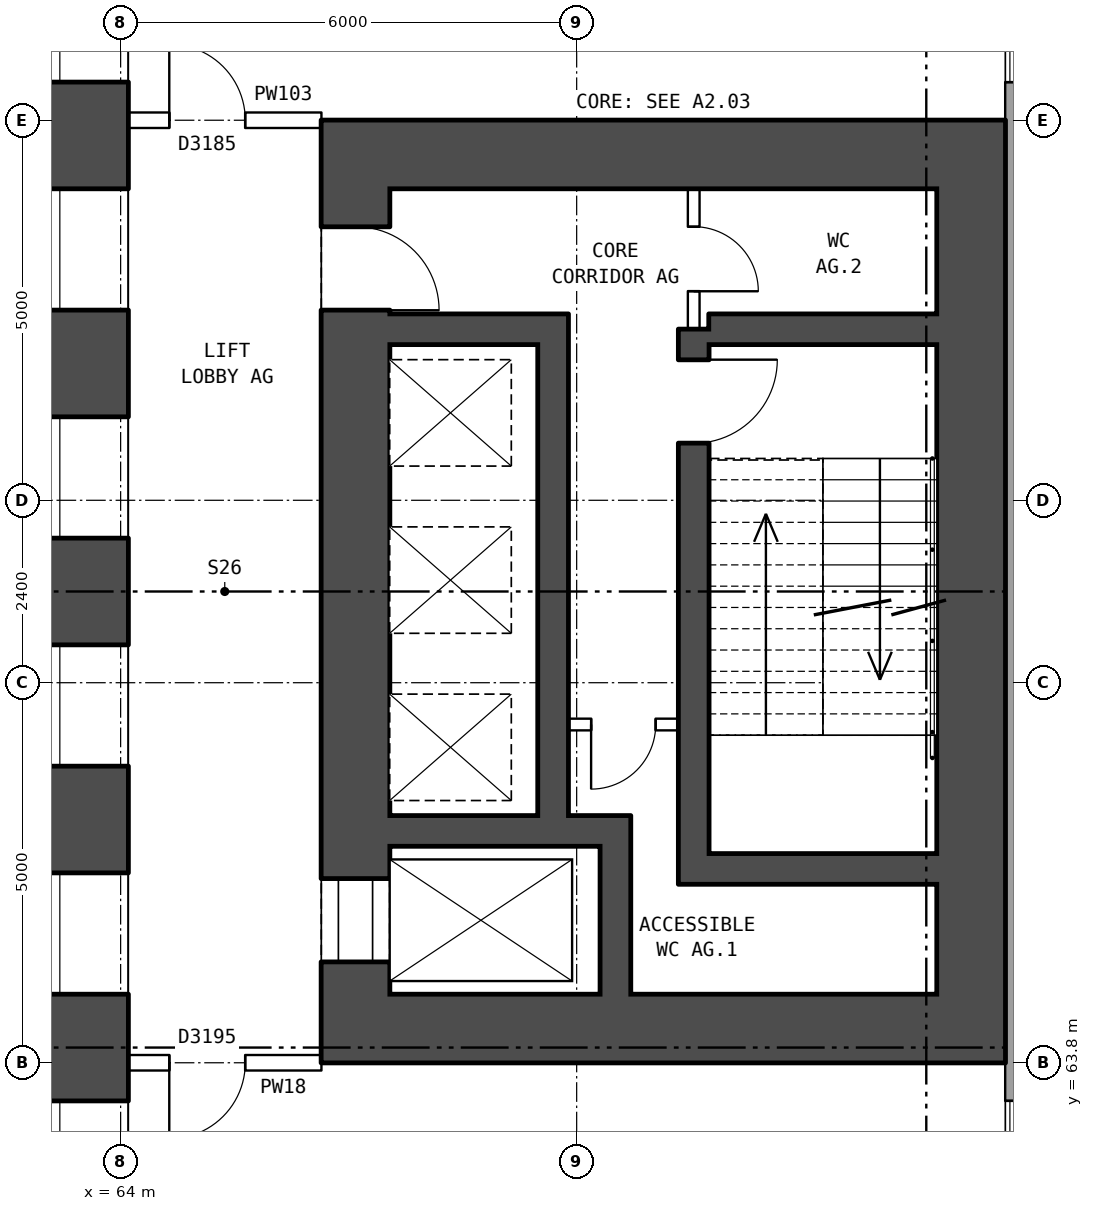
"""IFC4 building model, lengths in metres.
Left out: names, types, materials, properties, quantities, classifications, styles, units other than length and angle.
Written with IfcOpenShell. Run it as: python <this file> out.ifc"""

import sys

from ifc_helpers import new_model, si_unit, direction, frame, frame_2d, origin, place, context, subcontext, project, spatial, rectangle, extrude, element, fill, save


model = new_model("IFC4")
c1 = context("Model", 3, precision=1e-05, world=origin(), true_north=direction((0.0, 1.0)))
c2 = subcontext(c1, "Body", "Model", "MODEL_VIEW")
j1 = project(units=[si_unit("LENGTHUNIT", "METRE"), si_unit("PLANEANGLEUNIT", "RADIAN")], contexts=[c1])
p1 = place(None, origin())
s1 = spatial("IfcSite", under=j1, at=p1, CompositionType="ELEMENT")
p2 = place(p1, origin())
s2 = spatial("IfcBuilding", under=s1, at=p2, CompositionType="ELEMENT")
p3 = place(p2, frame((0.0, 0.0, 10.1)))
s3 = spatial("IfcBuildingStorey", under=s2, at=p3, CompositionType="ELEMENT", Elevation=10.1)
p4 = place(p3, frame((63.5, 56.4, -0.3), z_axis=(0.0, 0.0, 1.0), x_axis=(0.0, 1.0, 0.0)))
e1 = element("IfcWall", 1, at=p4, inside=s3, PredefinedType="SHEAR", context=c2, shape_type="SweptSolid", body=[
    extrude(rectangle(XDim=27.2, YDim=1.2, at=frame_2d((13.6, 0.0))), origin(), (0.0, 0.0, 1.0), 4.4),
])
p5 = place(p4, frame((2.3, 0.0, 0.8)))
e2 = element("IfcOpeningElement", 2, at=p5, cuts=e1, PredefinedType="OPENING", context=c2, shape_type="SweptSolid", body=[
    extrude(rectangle(XDim=1.6, YDim=1.8, at=frame_2d((0.8, 0.9))), frame((0.0, 0.61, 0.0), z_axis=(0.0, -1.0, 0.0), x_axis=(1.0, 0.0, 0.0)), (0.0, 0.0, 1.0), 1.22),
])
p6 = place(p4, frame((5.3, 0.0, 0.8)))
e3 = element("IfcOpeningElement", 3, at=p6, cuts=e1, PredefinedType="OPENING", context=c2, shape_type="SweptSolid", body=[
    extrude(rectangle(XDim=1.6, YDim=1.8, at=frame_2d((0.8, 0.9))), frame((0.0, 0.61, 0.0), z_axis=(0.0, -1.0, 0.0), x_axis=(1.0, 0.0, 0.0)), (0.0, 0.0, 1.0), 1.22),
])
p7 = place(p4, frame((8.3, 0.0, 0.8)))
e4 = element("IfcOpeningElement", 4, at=p7, cuts=e1, PredefinedType="OPENING", context=c2, shape_type="SweptSolid", body=[
    extrude(rectangle(XDim=1.6, YDim=1.8, at=frame_2d((0.8, 0.9))), frame((0.0, 0.61, 0.0), z_axis=(0.0, -1.0, 0.0), x_axis=(1.0, 0.0, 0.0)), (0.0, 0.0, 1.0), 1.22),
])
p8 = place(p4, frame((11.3, 0.0, 0.8)))
e5 = element("IfcOpeningElement", 5, at=p8, cuts=e1, PredefinedType="OPENING", context=c2, shape_type="SweptSolid", body=[
    extrude(rectangle(XDim=1.6, YDim=1.8, at=frame_2d((0.8, 0.9))), frame((0.0, 0.61, 0.0), z_axis=(0.0, -1.0, 0.0), x_axis=(1.0, 0.0, 0.0)), (0.0, 0.0, 1.0), 1.22),
])
p9 = place(p4, frame((14.3, 0.0, 0.8)))
e6 = element("IfcOpeningElement", 6, at=p9, cuts=e1, PredefinedType="OPENING", context=c2, shape_type="SweptSolid", body=[
    extrude(rectangle(XDim=1.6, YDim=1.8, at=frame_2d((0.8, 0.9))), frame((0.0, 0.61, 0.0), z_axis=(0.0, -1.0, 0.0), x_axis=(1.0, 0.0, 0.0)), (0.0, 0.0, 1.0), 1.22),
])
p10 = place(p4, frame((17.3, 0.0, 0.8)))
e7 = element("IfcOpeningElement", 7, at=p10, cuts=e1, PredefinedType="OPENING", context=c2, shape_type="SweptSolid", body=[
    extrude(rectangle(XDim=1.6, YDim=1.8, at=frame_2d((0.8, 0.9))), frame((0.0, 0.61, 0.0), z_axis=(0.0, -1.0, 0.0), x_axis=(1.0, 0.0, 0.0)), (0.0, 0.0, 1.0), 1.22),
])
p11 = place(p4, frame((20.3, 0.0, 0.8)))
e8 = element("IfcOpeningElement", 8, at=p11, cuts=e1, PredefinedType="OPENING", context=c2, shape_type="SweptSolid", body=[
    extrude(rectangle(XDim=1.6, YDim=1.8, at=frame_2d((0.8, 0.9))), frame((0.0, 0.61, 0.0), z_axis=(0.0, -1.0, 0.0), x_axis=(1.0, 0.0, 0.0)), (0.0, 0.0, 1.0), 1.22),
])
p12 = place(p4, frame((23.3, 0.0, 0.8)))
e9 = element("IfcOpeningElement", 9, at=p12, cuts=e1, PredefinedType="OPENING", context=c2, shape_type="SweptSolid", body=[
    extrude(rectangle(XDim=1.6, YDim=1.8, at=frame_2d((0.8, 0.9))), frame((0.0, 0.61, 0.0), z_axis=(0.0, -1.0, 0.0), x_axis=(1.0, 0.0, 0.0)), (0.0, 0.0, 1.0), 1.22),
])
p13 = place(p3, frame((75.82, 57.075, 0.0), z_axis=(0.0, 0.0, 1.0), x_axis=(0.0, 1.0, 0.0)))
e10 = element("IfcWall", 10, at=p13, inside=s3, PredefinedType="STANDARD", context=c2, shape_type="SweptSolid", body=[
    extrude(rectangle(XDim=25.851, YDim=0.36, at=frame_2d((12.925, 0.0))), origin(), (0.0, 0.0, 1.0), 4.3),
])
p14 = place(p13, frame((1.625, 0.0, 0.8)))
e11 = element("IfcOpeningElement", 11, at=p14, cuts=e10, PredefinedType="OPENING", context=c2, shape_type="SweptSolid", body=[
    extrude(rectangle(XDim=1.6, YDim=1.8, at=frame_2d((0.8, 0.9))), frame((0.0, 0.19, 0.0), z_axis=(0.0, -1.0, 0.0), x_axis=(1.0, 0.0, 0.0)), (0.0, 0.0, 1.0), 0.38),
])
p15 = place(p13, frame((4.625, 0.0, 0.8)))
e12 = element("IfcOpeningElement", 12, at=p15, cuts=e10, PredefinedType="OPENING", context=c2, shape_type="SweptSolid", body=[
    extrude(rectangle(XDim=1.6, YDim=1.8, at=frame_2d((0.8, 0.9))), frame((0.0, 0.19, 0.0), z_axis=(0.0, -1.0, 0.0), x_axis=(1.0, 0.0, 0.0)), (0.0, 0.0, 1.0), 0.38),
])
p16 = place(p13, frame((19.625, 0.0, 0.8)))
e13 = element("IfcOpeningElement", 13, at=p16, cuts=e10, PredefinedType="OPENING", context=c2, shape_type="SweptSolid", body=[
    extrude(rectangle(XDim=1.6, YDim=1.8, at=frame_2d((0.8, 0.9))), frame((0.0, 0.19, 0.0), z_axis=(0.0, -1.0, 0.0), x_axis=(1.0, 0.0, 0.0)), (0.0, 0.0, 1.0), 0.38),
])
p17 = place(p13, frame((22.625, 0.0, 0.8)))
e14 = element("IfcOpeningElement", 14, at=p17, cuts=e10, PredefinedType="OPENING", context=c2, shape_type="SweptSolid", body=[
    extrude(rectangle(XDim=1.6, YDim=1.8, at=frame_2d((0.8, 0.9))), frame((0.0, 0.19, 0.0), z_axis=(0.0, -1.0, 0.0), x_axis=(1.0, 0.0, 0.0)), (0.0, 0.0, 1.0), 0.38),
])
p18 = place(p3, frame((67.09, 64.7, 0.0), z_axis=(0.0, 0.0, 1.0), x_axis=(0.0, 1.0, 0.0)))
e15 = element("IfcWall", 15, at=p18, inside=s3, PredefinedType="SHEAR", context=c2, shape_type="SweptSolid", body=[
    extrude(rectangle(XDim=10.6, YDim=0.9, at=frame_2d((5.3, 0.0))), origin(), (0.0, 0.0, 1.0), 4.3),
])
p19 = place(p18, frame((0.425, 0.0, 0.0)))
e16 = element("IfcOpeningElement", 16, at=p19, cuts=e15, PredefinedType="OPENING", context=c2, shape_type="SweptSolid", body=[
    extrude(rectangle(XDim=1.1, YDim=2.1, at=frame_2d((0.55, 1.05))), frame((0.0, 0.46, 0.0), z_axis=(0.0, -1.0, 0.0), x_axis=(1.0, 0.0, 0.0)), (0.0, 0.0, 1.0), 0.92),
])
p20 = place(p18, frame((9.0, 0.0, 0.0)))
e17 = element("IfcOpeningElement", 17, at=p20, cuts=e15, PredefinedType="OPENING", context=c2, shape_type="SweptSolid", body=[
    extrude(rectangle(XDim=1.1, YDim=2.1, at=frame_2d((0.55, 1.05))), frame((0.0, 0.46, 0.0), z_axis=(0.0, -1.0, 0.0), x_axis=(1.0, 0.0, 0.0)), (0.0, 0.0, 1.0), 0.92),
])
p21 = place(p3, frame((75.19, 64.7, 0.0), z_axis=(0.0, 0.0, 1.0), x_axis=(0.0, 1.0, 0.0)))
e18 = element("IfcWall", 18, at=p21, inside=s3, PredefinedType="SHEAR", context=c2, shape_type="SweptSolid", body=[
    extrude(rectangle(XDim=10.6, YDim=0.9, at=frame_2d((5.3, 0.0))), origin(), (0.0, 0.0, 1.0), 4.3),
])
for number, where, z_axis, x_axis in (
    (19, (66.64, 64.25, 0.0), (0.0, 0.0, 1.0), (1.0, 0.0, 0.0)),
    (20, (66.64, 75.75, 0.0), (0.0, 0.0, 1.0), (1.0, 0.0, 0.0)),
):
    element("IfcWall", number, at=place(p3, frame(where, z_axis=z_axis, x_axis=x_axis)), inside=s3, PredefinedType="SHEAR", context=c2, shape_type="SweptSolid", body=[
        extrude(rectangle(XDim=9.0, YDim=0.9, at=frame_2d((4.5, 0.0))), origin(), (0.0, 0.0, 1.0), 4.3),
    ])
p22 = place(p3, frame((71.74, 66.35, 0.0), z_axis=(0.0, 0.0, 1.0), x_axis=(1.0, 0.0, 0.0)))
e21 = element("IfcWall", 21, at=p22, inside=s3, PredefinedType="SHEAR", context=c2, shape_type="SweptSolid", body=[
    extrude(rectangle(XDim=3.0, YDim=0.4, at=frame_2d((1.5, 0.0))), origin(), (0.0, 0.0, 1.0), 4.3),
])
p23 = place(p3, frame((67.54, 66.85, 0.0), z_axis=(0.0, 0.0, 1.0), x_axis=(1.0, 0.0, 0.0)))
e22 = element("IfcWall", 22, at=p23, inside=s3, PredefinedType="SHEAR", context=c2, shape_type="SweptSolid", body=[
    extrude(rectangle(XDim=3.17, YDim=0.4, at=frame_2d((1.585, 0.0))), origin(), (0.0, 0.0, 1.0), 4.3),
])
p24 = place(p3, frame((69.89, 68.25, 0.0), z_axis=(0.0, 0.0, 1.0), x_axis=(1.0, 0.0, 0.0)))
e23 = element("IfcWall", 23, at=p24, inside=s3, PredefinedType="PARTITIONING", context=c2, shape_type="SweptSolid", body=[
    extrude(rectangle(XDim=1.45, YDim=0.15, at=frame_2d((0.725, 0.0))), origin(), (0.0, 0.0, 1.0), 4.3),
])
p25 = place(p24, frame((0.3, 0.0, 0.0)))
e24 = element("IfcOpeningElement", 24, at=p25, cuts=e23, PredefinedType="OPENING", context=c2, shape_type="SweptSolid", body=[
    extrude(rectangle(XDim=0.85, YDim=2.1, at=frame_2d((0.425, 1.05))), frame((0.0, 0.085, 0.0), z_axis=(0.0, -1.0, 0.0), x_axis=(1.0, 0.0, 0.0)), (0.0, 0.0, 1.0), 0.17),
])
p26 = place(p3, frame((67.54, 73.45, 0.0), z_axis=(0.0, 0.0, 1.0), x_axis=(1.0, 0.0, 0.0)))
e25 = element("IfcWall", 25, at=p26, inside=s3, PredefinedType="SHEAR", context=c2, shape_type="SweptSolid", body=[
    extrude(rectangle(XDim=1.95, YDim=0.4, at=frame_2d((0.975, 0.0))), origin(), (0.0, 0.0, 1.0), 4.3),
])
p27 = place(p3, frame((71.74, 73.45, 0.0), z_axis=(0.0, 0.0, 1.0), x_axis=(1.0, 0.0, 0.0)))
e26 = element("IfcWall", 26, at=p27, inside=s3, PredefinedType="SHEAR", context=c2, shape_type="SweptSolid", body=[
    extrude(rectangle(XDim=3.0, YDim=0.4, at=frame_2d((1.5, 0.0))), origin(), (0.0, 0.0, 1.0), 4.3),
])
p28 = place(p3, frame((69.69, 67.05, 0.0), z_axis=(0.0, 0.0, 1.0), x_axis=(0.0, 1.0, 0.0)))
e27 = element("IfcWall", 27, at=p28, inside=s3, PredefinedType="SHEAR", context=c2, shape_type="SweptSolid", body=[
    extrude(rectangle(XDim=6.6, YDim=0.4, at=frame_2d((3.3, 0.0))), origin(), (0.0, 0.0, 1.0), 4.3),
])
p29 = place(p3, frame((70.51, 64.7, 0.0), z_axis=(0.0, 0.0, 1.0), x_axis=(0.0, 1.0, 0.0)))
e28 = element("IfcWall", 28, at=p29, inside=s3, PredefinedType="SHEAR", context=c2, shape_type="SweptSolid", body=[
    extrude(rectangle(XDim=1.95, YDim=0.4, at=frame_2d((0.975, 0.0))), origin(), (0.0, 0.0, 1.0), 4.3),
])
p30 = place(p3, frame((71.54, 66.15, 0.0), z_axis=(0.0, 0.0, 1.0), x_axis=(0.0, 1.0, 0.0)))
e29 = element("IfcWall", 29, at=p30, inside=s3, PredefinedType="SHEAR", context=c2, shape_type="SweptSolid", body=[
    extrude(rectangle(XDim=7.3, YDim=0.4, at=frame_2d((3.65, 0.0))), origin(), (0.0, 0.0, 1.0), 4.3),
])
p31 = place(p30, frame((5.8, 0.0, 0.0)))
e30 = element("IfcOpeningElement", 30, at=p31, cuts=e29, PredefinedType="OPENING", context=c2, shape_type="SweptSolid", body=[
    extrude(rectangle(XDim=1.1, YDim=2.1, at=frame_2d((0.55, 1.05))), frame((0.0, 0.21, 0.0), z_axis=(0.0, -1.0, 0.0), x_axis=(1.0, 0.0, 0.0)), (0.0, 0.0, 1.0), 0.42),
])
p32 = place(p3, frame((71.54, 73.45, 0.0), z_axis=(0.0, 0.0, 1.0), x_axis=(0.0, 1.0, 0.0)))
e31 = element("IfcWall", 31, at=p32, inside=s3, PredefinedType="PARTITIONING", context=c2, shape_type="SweptSolid", body=[
    extrude(rectangle(XDim=1.85, YDim=0.15, at=frame_2d((0.925, 0.0))), origin(), (0.0, 0.0, 1.0), 4.3),
])
p33 = place(p32, frame((0.5, 0.0, 0.0)))
e32 = element("IfcOpeningElement", 32, at=p33, cuts=e31, PredefinedType="OPENING", context=c2, shape_type="SweptSolid", body=[
    extrude(rectangle(XDim=0.85, YDim=2.1, at=frame_2d((0.425, 1.05))), frame((0.0, 0.085, 0.0), z_axis=(0.0, -1.0, 0.0), x_axis=(1.0, 0.0, 0.0)), (0.0, 0.0, 1.0), 0.17),
])
p34 = place(p3, frame((64.1, 63.8, 0.0), z_axis=(0.0, 0.0, 1.0), x_axis=(1.0, 0.0, 0.0)))
e33 = element("IfcWall", 33, at=p34, inside=s3, PredefinedType="PARTITIONING", context=c2, shape_type="SweptSolid", body=[
    extrude(rectangle(XDim=2.54, YDim=0.2, at=frame_2d((1.27, 0.0))), origin(), (0.0, 0.0, 1.0), 4.3),
])
p35 = place(p34, frame((0.54, 0.0, 0.0)))
e34 = element("IfcOpeningElement", 34, at=p35, cuts=e33, PredefinedType="OPENING", context=c2, shape_type="SweptSolid", body=[
    extrude(rectangle(XDim=1.0, YDim=2.1, at=frame_2d((0.5, 1.05))), frame((0.0, 0.11, 0.0), z_axis=(0.0, -1.0, 0.0), x_axis=(1.0, 0.0, 0.0)), (0.0, 0.0, 1.0), 0.22),
])
p36 = place(p3, frame((64.1, 76.2, 0.0), z_axis=(0.0, 0.0, 1.0), x_axis=(1.0, 0.0, 0.0)))
e35 = element("IfcWall", 35, at=p36, inside=s3, PredefinedType="PARTITIONING", context=c2, shape_type="SweptSolid", body=[
    extrude(rectangle(XDim=2.54, YDim=0.2, at=frame_2d((1.27, 0.0))), origin(), (0.0, 0.0, 1.0), 4.3),
])
p37 = place(p36, frame((0.54, 0.0, 0.0)))
e36 = element("IfcOpeningElement", 36, at=p37, cuts=e35, PredefinedType="OPENING", context=c2, shape_type="SweptSolid", body=[
    extrude(rectangle(XDim=1.0, YDim=2.1, at=frame_2d((0.5, 1.05))), frame((0.0, 0.11, 0.0), z_axis=(0.0, -1.0, 0.0), x_axis=(1.0, 0.0, 0.0)), (0.0, 0.0, 1.0), 0.22),
])
p38 = place(p15, origin())
e37 = element("IfcWindow", 37, at=p38, inside=s3, PartitioningType="SINGLE_PANEL", PredefinedType="WINDOW", context=c2, shape_type="SweptSolid", body=[
    extrude(rectangle(XDim=1.6, YDim=1.8, at=frame_2d((0.8, 0.9))), frame((0.0, 0.15, 0.0), z_axis=(0.0, -1.0, 0.0), x_axis=(1.0, 0.0, 0.0)), (0.0, 0.0, 1.0), 0.06),
])
fill(e12, e37)
p39 = place(p16, origin())
e38 = element("IfcWindow", 38, at=p39, inside=s3, PartitioningType="SINGLE_PANEL", PredefinedType="WINDOW", context=c2, shape_type="SweptSolid", body=[
    extrude(rectangle(XDim=1.6, YDim=1.8, at=frame_2d((0.8, 0.9))), frame((0.0, 0.15, 0.0), z_axis=(0.0, -1.0, 0.0), x_axis=(1.0, 0.0, 0.0)), (0.0, 0.0, 1.0), 0.06),
])
fill(e13, e38)
p40 = place(p6, origin())
e39 = element("IfcWindow", 39, at=p40, inside=s3, PartitioningType="SINGLE_PANEL", PredefinedType="WINDOW", context=c2, shape_type="SweptSolid", body=[
    extrude(rectangle(XDim=1.6, YDim=1.8, at=frame_2d((0.8, 0.9))), frame((0.0, 0.33, 0.0), z_axis=(0.0, -1.0, 0.0), x_axis=(1.0, 0.0, 0.0)), (0.0, 0.0, 1.0), 0.06),
])
fill(e3, e39)
p41 = place(p7, origin())
e40 = element("IfcWindow", 40, at=p41, inside=s3, PartitioningType="SINGLE_PANEL", PredefinedType="WINDOW", context=c2, shape_type="SweptSolid", body=[
    extrude(rectangle(XDim=1.6, YDim=1.8, at=frame_2d((0.8, 0.9))), frame((0.0, 0.33, 0.0), z_axis=(0.0, -1.0, 0.0), x_axis=(1.0, 0.0, 0.0)), (0.0, 0.0, 1.0), 0.06),
])
fill(e4, e40)
p42 = place(p8, origin())
e41 = element("IfcWindow", 41, at=p42, inside=s3, PartitioningType="SINGLE_PANEL", PredefinedType="WINDOW", context=c2, shape_type="SweptSolid", body=[
    extrude(rectangle(XDim=1.6, YDim=1.8, at=frame_2d((0.8, 0.9))), frame((0.0, 0.33, 0.0), z_axis=(0.0, -1.0, 0.0), x_axis=(1.0, 0.0, 0.0)), (0.0, 0.0, 1.0), 0.06),
])
fill(e5, e41)
p43 = place(p9, origin())
e42 = element("IfcWindow", 42, at=p43, inside=s3, PartitioningType="SINGLE_PANEL", PredefinedType="WINDOW", context=c2, shape_type="SweptSolid", body=[
    extrude(rectangle(XDim=1.6, YDim=1.8, at=frame_2d((0.8, 0.9))), frame((0.0, 0.33, 0.0), z_axis=(0.0, -1.0, 0.0), x_axis=(1.0, 0.0, 0.0)), (0.0, 0.0, 1.0), 0.06),
])
fill(e6, e42)
p44 = place(p10, origin())
e43 = element("IfcWindow", 43, at=p44, inside=s3, PartitioningType="SINGLE_PANEL", PredefinedType="WINDOW", context=c2, shape_type="SweptSolid", body=[
    extrude(rectangle(XDim=1.6, YDim=1.8, at=frame_2d((0.8, 0.9))), frame((0.0, 0.33, 0.0), z_axis=(0.0, -1.0, 0.0), x_axis=(1.0, 0.0, 0.0)), (0.0, 0.0, 1.0), 0.06),
])
fill(e7, e43)
p45 = place(p11, origin())
e44 = element("IfcWindow", 44, at=p45, inside=s3, PartitioningType="SINGLE_PANEL", PredefinedType="WINDOW", context=c2, shape_type="SweptSolid", body=[
    extrude(rectangle(XDim=1.6, YDim=1.8, at=frame_2d((0.8, 0.9))), frame((0.0, 0.33, 0.0), z_axis=(0.0, -1.0, 0.0), x_axis=(1.0, 0.0, 0.0)), (0.0, 0.0, 1.0), 0.06),
])
fill(e8, e44)
p46 = place(p19, origin())
e45 = element("IfcDoor", 45, at=p46, inside=s3, OperationType="DOUBLE_DOOR_SLIDING", PredefinedType="DOOR", context=c2, shape_type="SweptSolid", body=[
    extrude(rectangle(XDim=1.1, YDim=2.1, at=frame_2d((0.55, 1.05))), frame((0.0, -0.385, 0.0), z_axis=(0.0, -1.0, 0.0), x_axis=(1.0, 0.0, 0.0)), (0.0, 0.0, 1.0), 0.05),
])
fill(e16, e45)
p47 = place(p20, frame((1.1, 0.0, 0.0), z_axis=(0.0, 0.0, 1.0), x_axis=(-1.0, 0.0, 0.0)))
e46 = element("IfcDoor", 46, at=p47, inside=s3, OperationType="SINGLE_SWING_RIGHT", PredefinedType="DOOR", context=c2, shape_type="SweptSolid", body=[
    extrude(rectangle(XDim=1.1, YDim=2.1, at=frame_2d((0.55, 1.05))), frame((0.0, 0.435, 0.0), z_axis=(0.0, -1.0, 0.0), x_axis=(1.0, 0.0, 0.0)), (0.0, 0.0, 1.0), 0.05),
])
fill(e17, e46)
p48 = place(p31, frame((1.1, 0.0, 0.0), z_axis=(0.0, 0.0, 1.0), x_axis=(-1.0, 0.0, 0.0)))
e47 = element("IfcDoor", 47, at=p48, inside=s3, OperationType="SINGLE_SWING_LEFT", PredefinedType="DOOR", context=c2, shape_type="SweptSolid", body=[
    extrude(rectangle(XDim=1.1, YDim=2.1, at=frame_2d((0.55, 1.05))), frame((0.0, 0.025, 0.0), z_axis=(0.0, -1.0, 0.0), x_axis=(1.0, 0.0, 0.0)), (0.0, 0.0, 1.0), 0.05),
])
fill(e30, e47)
p49 = place(p25, frame((0.85, 0.0, 0.0), z_axis=(0.0, 0.0, 1.0), x_axis=(-1.0, 0.0, 0.0)))
e48 = element("IfcDoor", 48, at=p49, inside=s3, OperationType="SINGLE_SWING_RIGHT", PredefinedType="DOOR", context=c2, shape_type="SweptSolid", body=[
    extrude(rectangle(XDim=0.85, YDim=2.1, at=frame_2d((0.425, 1.05))), frame((0.0, 0.025, 0.0), z_axis=(0.0, -1.0, 0.0), x_axis=(1.0, 0.0, 0.0)), (0.0, 0.0, 1.0), 0.05),
])
fill(e24, e48)
p50 = place(p33, frame((0.85, 0.0, 0.0), z_axis=(0.0, 0.0, 1.0), x_axis=(-1.0, 0.0, 0.0)))
e49 = element("IfcDoor", 49, at=p50, inside=s3, OperationType="SINGLE_SWING_RIGHT", PredefinedType="DOOR", context=c2, shape_type="SweptSolid", body=[
    extrude(rectangle(XDim=0.85, YDim=2.1, at=frame_2d((0.425, 1.05))), frame((0.0, 0.025, 0.0), z_axis=(0.0, -1.0, 0.0), x_axis=(1.0, 0.0, 0.0)), (0.0, 0.0, 1.0), 0.05),
])
fill(e32, e49)
p51 = place(p35, frame((1.0, 0.0, 0.0), z_axis=(0.0, 0.0, 1.0), x_axis=(-1.0, 0.0, 0.0)))
e50 = element("IfcDoor", 50, at=p51, inside=s3, OperationType="SINGLE_SWING_RIGHT", PredefinedType="DOOR", context=c2, shape_type="SweptSolid", body=[
    extrude(rectangle(XDim=1.0, YDim=2.1, at=frame_2d((0.5, 1.05))), frame((0.0, 0.025, 0.0), z_axis=(0.0, -1.0, 0.0), x_axis=(1.0, 0.0, 0.0)), (0.0, 0.0, 1.0), 0.05),
])
fill(e34, e50)
p52 = place(p37, origin())
e51 = element("IfcDoor", 51, at=p52, inside=s3, OperationType="SINGLE_SWING_LEFT", PredefinedType="DOOR", context=c2, shape_type="SweptSolid", body=[
    extrude(rectangle(XDim=1.0, YDim=2.1, at=frame_2d((0.5, 1.05))), frame((0.0, 0.025, 0.0), z_axis=(0.0, -1.0, 0.0), x_axis=(1.0, 0.0, 0.0)), (0.0, 0.0, 1.0), 0.05),
])
fill(e36, e51)
save(model, sys.argv[1])
